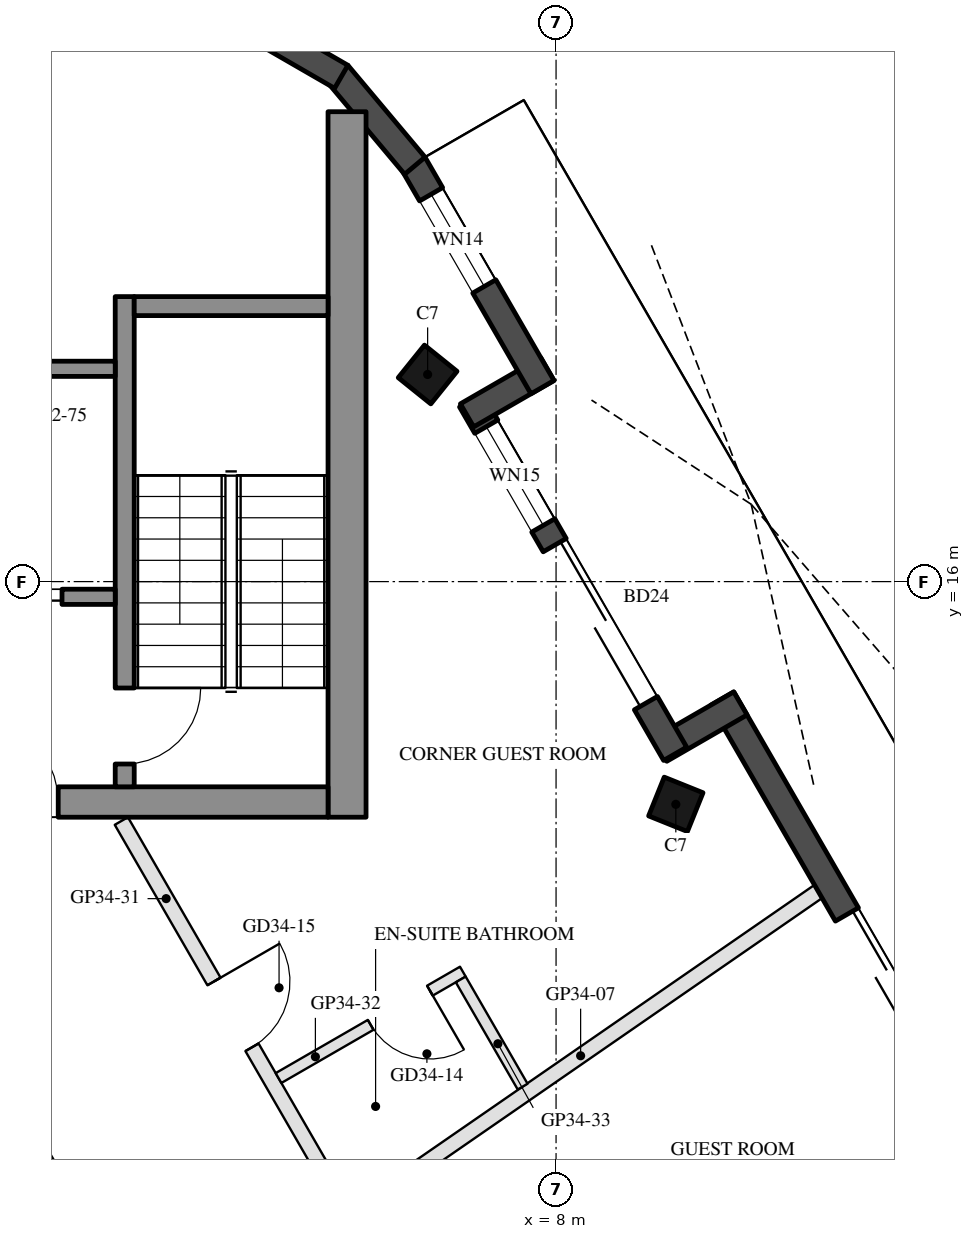
"""IFC4 building model, lengths in metres.
Left out: names, types, materials, properties, quantities, classifications, styles, units other than length and angle.
Written with IfcOpenShell. Run it as: python <this file> out.ifc"""

import sys

from ifc_helpers import new_model, si_unit, direction, frame, frame_2d, origin, origin_2d, place, context, subcontext, project, spatial, rectangle, hollow_rectangle, extrude, boolean, halfspace, element, fill, save


model = new_model("IFC4")
c1 = context("Model", 3, precision=1e-05, world=origin(), true_north=direction((0.0, 1.0)))
c2 = subcontext(c1, "Body", "Model", "MODEL_VIEW")
j1 = project(units=[si_unit("LENGTHUNIT", "METRE"), si_unit("PLANEANGLEUNIT", "RADIAN")], contexts=[c1])
p1 = place(None, origin())
s1 = spatial("IfcSite", under=j1, at=p1, CompositionType="ELEMENT")
p2 = place(p1, origin())
s2 = spatial("IfcBuilding", under=s1, at=p2, CompositionType="ELEMENT")
p3 = place(p2, frame((0.0, 0.0, 320.7)))
s3 = spatial("IfcBuildingStorey", under=s2, at=p3, CompositionType="ELEMENT", Elevation=320.7)
p4 = place(p3, frame((9.576, 13.07, 0.0), z_axis=(-0.100582464937, -0.128315882454, 0.986619583252), x_axis=(-0.502859866582, 0.862221844537, 0.060872369628)))
e1 = element("IfcColumn", 1, at=p4, inside=s3, PredefinedType="COLUMN", context=c2, shape_type="SweptSolid", body=[
    boolean("DIFFERENCE", boolean("DIFFERENCE", extrude(hollow_rectangle(XDim=0.55, YDim=0.55, WallThickness=0.025, at=origin_2d()), origin(), (0.0, 0.0, 1.0), 3.75), halfspace(frame((0.0, 0.0, 0.034), z_axis=(0.0, 0.0, 1.0), x_axis=(1.0, 0.0, 0.0)), True)), halfspace(frame((0.0, 0.0, 3.716), z_axis=(0.0, 0.0, 1.0), x_axis=(1.0, 0.0, 0.0)), False)),
])
p5 = place(p3, frame((6.31, 18.725, 0.0), z_axis=(-0.069729210429, -0.17998811977, 0.981194228456), x_axis=(-0.504140775731, 0.855098670829, 0.121030332527)))
e2 = element("IfcColumn", 2, at=p5, inside=s3, PredefinedType="COLUMN", context=c2, shape_type="SweptSolid", body=[
    boolean("DIFFERENCE", boolean("DIFFERENCE", extrude(hollow_rectangle(XDim=0.55, YDim=0.55, WallThickness=0.025, at=origin_2d()), origin(), (0.0, 0.0, 1.0), 3.771), halfspace(frame((0.0, 0.0, 0.04), z_axis=(0.0, 0.0, 1.0), x_axis=(1.0, 0.0, 0.0)), True)), halfspace(frame((0.0, 0.0, 3.731), z_axis=(0.0, 0.0, 1.0), x_axis=(1.0, 0.0, 0.0)), False)),
])
p6 = place(p3, frame((14.352, 7.247, 0.0), z_axis=(0.0, 0.0, 1.0), x_axis=(-0.499993893925, 0.8660289291, 0.0)))
e3 = element("IfcWall", 3, at=p6, inside=s3, PredefinedType="SOLIDWALL", context=c2, shape_type="SweptSolid", body=[
    extrude(rectangle(XDim=8.331, YDim=0.35, at=frame_2d((4.165, 0.0))), origin(), (0.0, 0.0, 1.0), 3.55),
])
p7 = place(p6, frame((3.25, 0.0, 0.0)))
e4 = element("IfcOpeningElement", 4, at=p7, cuts=e3, PredefinedType="OPENING", context=c2, shape_type="SweptSolid", body=[
    extrude(rectangle(XDim=1.8, YDim=2.4, at=frame_2d((0.9, 1.2))), frame((0.0, 0.185, 0.0), z_axis=(0.0, -1.0, 0.0), x_axis=(1.0, 0.0, 0.0)), (0.0, 0.0, 1.0), 0.37),
])
p8 = place(p6, frame((1.528, 0.0, 0.3)))
e5 = element("IfcOpeningElement", 5, at=p8, cuts=e3, PredefinedType="OPENING", context=c2, shape_type="SweptSolid", body=[
    extrude(rectangle(XDim=1.4, YDim=2.65, at=frame_2d((0.7, 1.325))), frame((0.0, 0.185, 0.0), z_axis=(0.0, -1.0, 0.0), x_axis=(1.0, 0.0, 0.0)), (0.0, 0.0, 1.0), 0.37),
])
p9 = place(p3, frame((10.426, 14.397, 0.0), z_axis=(0.0, 0.0, 1.0), x_axis=(-0.866005645448, -0.500034220881, 0.0)))
e6 = element("IfcWall", 6, at=p9, inside=s3, PredefinedType="SOLIDWALL", context=c2, shape_type="SweptSolid", body=[
    extrude(rectangle(XDim=1.22, YDim=0.35, at=frame_2d((0.61, 0.0))), origin(), (0.0, 0.0, 1.0), 3.55),
])
p10 = place(p3, frame((9.567, 13.734, 0.0), z_axis=(0.0, 0.0, 1.0), x_axis=(-0.499996591357, 0.866027371756, 0.0)))
e7 = element("IfcWall", 7, at=p10, inside=s3, PredefinedType="SOLIDWALL", context=c2, shape_type="SweptSolid", body=[
    extrude(rectangle(XDim=5.371, YDim=0.35, at=frame_2d((2.685, 0.0))), origin(), (0.0, 0.0, 1.0), 3.55),
])
p11 = place(p10, frame((0.77, 0.0, 0.0)))
e8 = element("IfcOpeningElement", 8, at=p11, cuts=e7, PredefinedType="OPENING", context=c2, shape_type="SweptSolid", body=[
    extrude(rectangle(XDim=2.4, YDim=2.4, at=frame_2d((1.2, 1.2))), frame((0.0, 0.185, 0.0), z_axis=(0.0, -1.0, 0.0), x_axis=(1.0, 0.0, 0.0)), (0.0, 0.0, 1.0), 0.37),
])
p12 = place(p10, frame((3.47, 0.0, 0.3)))
e9 = element("IfcOpeningElement", 9, at=p12, cuts=e7, PredefinedType="OPENING", context=c2, shape_type="SweptSolid", body=[
    extrude(rectangle(XDim=1.5, YDim=2.65, at=frame_2d((0.75, 1.325))), frame((0.0, 0.185, 0.0), z_axis=(0.0, -1.0, 0.0), x_axis=(1.0, 0.0, 0.0)), (0.0, 0.0, 1.0), 0.37),
])
p13 = place(p3, frame((6.829, 18.188, 0.0), z_axis=(0.0, 0.0, 1.0), x_axis=(0.866042269935, 0.499970785833, 0.0)))
e10 = element("IfcWall", 10, at=p13, inside=s3, PredefinedType="SOLIDWALL", context=c2, shape_type="SweptSolid", body=[
    extrude(rectangle(XDim=1.22, YDim=0.35, at=frame_2d((0.61, 0.0))), origin(), (0.0, 0.0, 1.0), 3.55),
])
p14 = place(p3, frame((7.821, 18.558, 0.0), z_axis=(0.0, 0.0, 1.0), x_axis=(-0.500000656212, 0.86602502492, 0.0)))
e11 = element("IfcWall", 11, at=p14, inside=s3, PredefinedType="SOLIDWALL", context=c2, shape_type="SweptSolid", body=[
    extrude(rectangle(XDim=3.393, YDim=0.35, at=frame_2d((1.697, 0.0))), origin(), (0.0, 0.0, 1.0), 3.55),
])
p15 = place(p14, frame((1.531, 0.0, 0.3)))
e12 = element("IfcOpeningElement", 12, at=p15, cuts=e11, PredefinedType="OPENING", context=c2, shape_type="SweptSolid", body=[
    extrude(rectangle(XDim=1.4, YDim=2.65, at=frame_2d((0.7, 1.325))), frame((0.0, 0.185, 0.0), z_axis=(0.0, -1.0, 0.0), x_axis=(1.0, 0.0, 0.0)), (0.0, 0.0, 1.0), 0.37),
])
for number, where, z_axis, x_axis in (
    (13, (6.142, 21.472, 0.0), (0.0, 0.0, 1.0), (-0.643, 0.766, 0.0)),
    (14, (5.174, 22.642, 0.0), (0.0, 0.0, 1.0), (-0.866, 0.5, 0.0)),
):
    element("IfcWall", number, at=place(p3, frame(where, z_axis=z_axis, x_axis=x_axis)), inside=s3, PredefinedType="SOLIDWALL", context=c2, shape_type="SweptSolid", body=[
        extrude(rectangle(XDim=1.579, YDim=0.35, at=frame_2d((0.79, 0.0))), origin(), (0.0, 0.0, 1.0), 3.55),
    ])
p16 = place(p3, frame((5.25, 12.9, 0.0), z_axis=(0.0, 0.0, 1.0), x_axis=(0.0, 1.0, 0.0)))
e15 = element("IfcWall", 15, at=p16, inside=s3, PredefinedType="SHEAR", context=c2, shape_type="SweptSolid", body=[
    extrude(rectangle(XDim=9.283, YDim=0.5, at=frame_2d((4.641, 0.0))), origin(), (0.0, 0.0, 1.0), 3.5),
])
p17 = place(p3, frame((5.0, 13.1, 0.0), z_axis=(0.0, 0.0, 1.0), x_axis=(-1.0, 0.0, 0.0)))
e16 = element("IfcWall", 16, at=p17, inside=s3, PredefinedType="SHEAR", context=c2, shape_type="SweptSolid", body=[
    extrude(rectangle(XDim=10.0, YDim=0.4, at=frame_2d((5.0, 0.0))), origin(), (0.0, 0.0, 1.0), 3.5),
])
p18 = place(p17, frame((3.55, 0.0, 0.0)))
e17 = element("IfcOpeningElement", 17, at=p18, cuts=e16, PredefinedType="OPENING", context=c2, shape_type="SweptSolid", body=[
    extrude(rectangle(XDim=1.1, YDim=2.1, at=frame_2d((0.55, 1.05))), frame((0.0, 0.21, 0.0), z_axis=(0.0, -1.0, 0.0), x_axis=(1.0, 0.0, 0.0)), (0.0, 0.0, 1.0), 0.42),
])
p19 = place(p17, frame((5.85, 0.0, 0.0)))
e18 = element("IfcOpeningElement", 18, at=p19, cuts=e16, PredefinedType="OPENING", context=c2, shape_type="SweptSolid", body=[
    extrude(rectangle(XDim=1.4, YDim=2.1, at=frame_2d((0.7, 1.05))), frame((0.0, 0.21, 0.0), z_axis=(0.0, -1.0, 0.0), x_axis=(1.0, 0.0, 0.0)), (0.0, 0.0, 1.0), 0.42),
])
p20 = place(p3, frame((2.325, 13.3, 0.0), z_axis=(0.0, 0.0, 1.0), x_axis=(0.0, 1.0, 0.0)))
e19 = element("IfcWall", 19, at=p20, inside=s3, PredefinedType="SHEAR", context=c2, shape_type="SweptSolid", body=[
    extrude(rectangle(XDim=6.45, YDim=0.25, at=frame_2d((3.225, 0.0))), origin(), (0.0, 0.0, 1.0), 3.5),
])
p21 = place(p20, frame((0.3, 0.0, 0.0)))
e20 = element("IfcOpeningElement", 20, at=p21, cuts=e19, PredefinedType="OPENING", context=c2, shape_type="SweptSolid", body=[
    extrude(rectangle(XDim=1.0, YDim=2.1, at=frame_2d((0.5, 1.05))), frame((0.0, 0.135, 0.0), z_axis=(0.0, -1.0, 0.0), x_axis=(1.0, 0.0, 0.0)), (0.0, 0.0, 1.0), 0.27),
])
p22 = place(p3, frame((5.0, 19.625, 0.0), z_axis=(0.0, 0.0, 1.0), x_axis=(-1.0, 0.0, 0.0)))
e21 = element("IfcWall", 21, at=p22, inside=s3, PredefinedType="SHEAR", context=c2, shape_type="SweptSolid", body=[
    extrude(rectangle(XDim=2.55, YDim=0.25, at=frame_2d((1.275, 0.0))), origin(), (0.0, 0.0, 1.0), 3.5),
])
p23 = place(p3, frame((2.2, 18.8, 0.0), z_axis=(0.0, 0.0, 1.0), x_axis=(-1.0, 0.0, 0.0)))
e22 = element("IfcWall", 22, at=p23, inside=s3, PredefinedType="SHEAR", context=c2, shape_type="SweptSolid", body=[
    extrude(rectangle(XDim=2.8, YDim=0.2, at=frame_2d((1.4, 0.0))), origin(), (0.0, 0.0, 1.0), 3.5),
])
p24 = place(p3, frame((2.2, 15.8, 0.0), z_axis=(0.0, 0.0, 1.0), x_axis=(-1.0, 0.0, 0.0)))
e23 = element("IfcWall", 23, at=p24, inside=s3, PredefinedType="SHEAR", context=c2, shape_type="SweptSolid", body=[
    extrude(rectangle(XDim=2.8, YDim=0.2, at=frame_2d((1.4, 0.0))), origin(), (0.0, 0.0, 1.0), 3.5),
])
p25 = place(p24, frame((0.7, 0.0, 0.0)))
e24 = element("IfcOpeningElement", 24, at=p25, cuts=e23, PredefinedType="OPENING", context=c2, shape_type="SweptSolid", body=[
    extrude(rectangle(XDim=1.2, YDim=2.1, at=frame_2d((0.6, 1.05))), frame((0.0, 0.11, 0.0), z_axis=(0.0, -1.0, 0.0), x_axis=(1.0, 0.0, 0.0)), (0.0, 0.0, 1.0), 0.22),
])
p26 = place(p3, frame((11.45, 11.923, 0.0), z_axis=(0.0, 0.0, 1.0), x_axis=(-0.822640491705, -0.56856188881, 0.0)))
e25 = element("IfcWall", 25, at=p26, inside=s3, PredefinedType="PARTITIONING", context=c2, shape_type="SweptSolid", body=[
    extrude(rectangle(XDim=7.603, YDim=0.2, at=frame_2d((3.801, 0.0))), origin(), (0.0, 0.0, 1.0), 3.1),
])
p27 = place(p3, frame((2.281, 12.85, 0.0), z_axis=(0.0, 0.0, 1.0), x_axis=(0.499991277142, -0.86603043987, 0.0)))
e26 = element("IfcWall", 26, at=p27, inside=s3, PredefinedType="PARTITIONING", context=c2, shape_type="SweptSolid", body=[
    extrude(rectangle(XDim=5.896, YDim=0.2, at=frame_2d((2.948, 0.0))), origin(), (0.0, 0.0, 1.0), 3.15),
])
p28 = place(p27, frame((2.438, 0.0, 0.0)))
e27 = element("IfcOpeningElement", 27, at=p28, cuts=e26, PredefinedType="OPENING", context=c2, shape_type="SweptSolid", body=[
    extrude(rectangle(XDim=1.0, YDim=2.1, at=frame_2d((0.5, 1.05))), frame((0.0, 0.11, 0.0), z_axis=(0.0, -1.0, 0.0), x_axis=(1.0, 0.0, 0.0)), (0.0, 0.0, 1.0), 0.22),
])
p29 = place(p3, frame((6.773, 10.868, 0.0), z_axis=(0.0, 0.0, 1.0), x_axis=(-0.865996816683, -0.500049511043, 0.0)))
e28 = element("IfcWall", 28, at=p29, inside=s3, PredefinedType="PARTITIONING", context=c2, shape_type="SweptSolid", body=[
    extrude(rectangle(XDim=2.8, YDim=0.15, at=frame_2d((1.4, 0.0))), origin(), (0.0, 0.0, 1.0), 3.55),
])
p30 = place(p29, frame((0.5, 0.0, 0.0)))
e29 = element("IfcOpeningElement", 29, at=p30, cuts=e28, PredefinedType="OPENING", context=c2, shape_type="SweptSolid", body=[
    extrude(rectangle(XDim=0.9, YDim=2.1, at=frame_2d((0.45, 1.05))), frame((0.0, 0.085, 0.0), z_axis=(0.0, -1.0, 0.0), x_axis=(1.0, 0.0, 0.0)), (0.0, 0.0, 1.0), 0.17),
])
p31 = place(p3, frame((7.56, 9.355, 0.0), z_axis=(0.0, 0.0, 1.0), x_axis=(-0.500025283505, 0.866010805854, 0.0)))
e30 = element("IfcWall", 30, at=p31, inside=s3, PredefinedType="PARTITIONING", context=c2, shape_type="SweptSolid", body=[
    extrude(rectangle(XDim=1.628, YDim=0.15, at=frame_2d((0.814, 0.0))), origin(), (0.0, 0.0, 1.0), 3.55),
])
p32 = place(p7, frame((1.8, 0.0, 0.0), z_axis=(0.0, 0.0, 1.0), x_axis=(-1.0, 0.0, 0.0)))
e31 = element("IfcDoor", 31, at=p32, inside=s3, OperationType="SLIDING_TO_LEFT", PredefinedType="DOOR", context=c2, shape_type="SweptSolid", body=[
    extrude(rectangle(XDim=1.8, YDim=2.4, at=frame_2d((0.9, 1.2))), frame((0.0, 0.025, 0.0), z_axis=(0.0, -1.0, 0.0), x_axis=(1.0, 0.0, 0.0)), (0.0, 0.0, 1.0), 0.05),
])
fill(e4, e31)
p33 = place(p11, frame((2.4, 0.0, 0.0), z_axis=(0.0, 0.0, 1.0), x_axis=(-1.0, 0.0, 0.0)))
e32 = element("IfcDoor", 32, at=p33, inside=s3, OperationType="SLIDING_TO_LEFT", PredefinedType="DOOR", context=c2, shape_type="SweptSolid", body=[
    extrude(rectangle(XDim=2.4, YDim=2.4, at=frame_2d((1.2, 1.2))), frame((0.0, 0.025, 0.0), z_axis=(0.0, -1.0, 0.0), x_axis=(1.0, 0.0, 0.0)), (0.0, 0.0, 1.0), 0.05),
])
fill(e8, e32)
p34 = place(p12, origin())
e33 = element("IfcWindow", 33, at=p34, inside=s3, PartitioningType="SINGLE_PANEL", PredefinedType="WINDOW", context=c2, shape_type="SweptSolid", body=[
    extrude(rectangle(XDim=1.5, YDim=2.65, at=frame_2d((0.75, 1.325))), frame((0.0, 0.03, 0.0), z_axis=(0.0, -1.0, 0.0), x_axis=(1.0, 0.0, 0.0)), (0.0, 0.0, 1.0), 0.06),
])
fill(e9, e33)
p35 = place(p15, origin())
e34 = element("IfcWindow", 34, at=p35, inside=s3, PartitioningType="SINGLE_PANEL", PredefinedType="WINDOW", context=c2, shape_type="SweptSolid", body=[
    extrude(rectangle(XDim=1.4, YDim=2.65, at=frame_2d((0.7, 1.325))), frame((0.0, 0.03, 0.0), z_axis=(0.0, -1.0, 0.0), x_axis=(1.0, 0.0, 0.0)), (0.0, 0.0, 1.0), 0.06),
])
fill(e12, e34)
p36 = place(p25, origin())
e35 = element("IfcDoor", 35, at=p36, inside=s3, OperationType="DOUBLE_DOOR_SLIDING", PredefinedType="DOOR", context=c2, shape_type="SweptSolid", body=[
    extrude(rectangle(XDim=1.2, YDim=2.1, at=frame_2d((0.6, 1.05))), frame((0.0, 0.025, 0.0), z_axis=(0.0, -1.0, 0.0), x_axis=(1.0, 0.0, 0.0)), (0.0, 0.0, 1.0), 0.05),
])
fill(e24, e35)
p37 = place(p18, frame((1.1, 0.0, 0.0), z_axis=(0.0, 0.0, 1.0), x_axis=(-1.0, 0.0, 0.0)))
e36 = element("IfcDoor", 36, at=p37, inside=s3, OperationType="SINGLE_SWING_LEFT", PredefinedType="DOOR", context=c2, shape_type="SweptSolid", body=[
    extrude(rectangle(XDim=1.1, YDim=2.1, at=frame_2d((0.55, 1.05))), frame((0.0, 0.025, 0.0), z_axis=(0.0, -1.0, 0.0), x_axis=(1.0, 0.0, 0.0)), (0.0, 0.0, 1.0), 0.05),
])
fill(e17, e36)
p38 = place(p21, frame((1.0, 0.0, 0.0), z_axis=(0.0, 0.0, 1.0), x_axis=(-1.0, 0.0, 0.0)))
e37 = element("IfcDoor", 37, at=p38, inside=s3, OperationType="SINGLE_SWING_LEFT", PredefinedType="DOOR", context=c2, shape_type="SweptSolid", body=[
    extrude(rectangle(XDim=1.0, YDim=2.1, at=frame_2d((0.5, 1.05))), frame((0.0, 0.025, 0.0), z_axis=(0.0, -1.0, 0.0), x_axis=(1.0, 0.0, 0.0)), (0.0, 0.0, 1.0), 0.05),
])
fill(e20, e37)
p39 = place(p30, origin())
e38 = element("IfcDoor", 38, at=p39, inside=s3, OperationType="SINGLE_SWING_LEFT", PredefinedType="DOOR", context=c2, shape_type="SweptSolid", body=[
    extrude(rectangle(XDim=0.9, YDim=2.1, at=frame_2d((0.45, 1.05))), frame((0.0, 0.025, 0.0), z_axis=(0.0, -1.0, 0.0), x_axis=(1.0, 0.0, 0.0)), (0.0, 0.0, 1.0), 0.05),
])
fill(e29, e38)
p40 = place(p28, origin())
e39 = element("IfcDoor", 39, at=p40, inside=s3, OperationType="SINGLE_SWING_LEFT", PredefinedType="DOOR", context=c2, shape_type="SweptSolid", body=[
    extrude(rectangle(XDim=1.0, YDim=2.1, at=frame_2d((0.5, 1.05))), frame((0.0, 0.025, 0.0), z_axis=(0.0, -1.0, 0.0), x_axis=(1.0, 0.0, 0.0)), (0.0, 0.0, 1.0), 0.05),
])
fill(e27, e39)
save(model, sys.argv[1])
